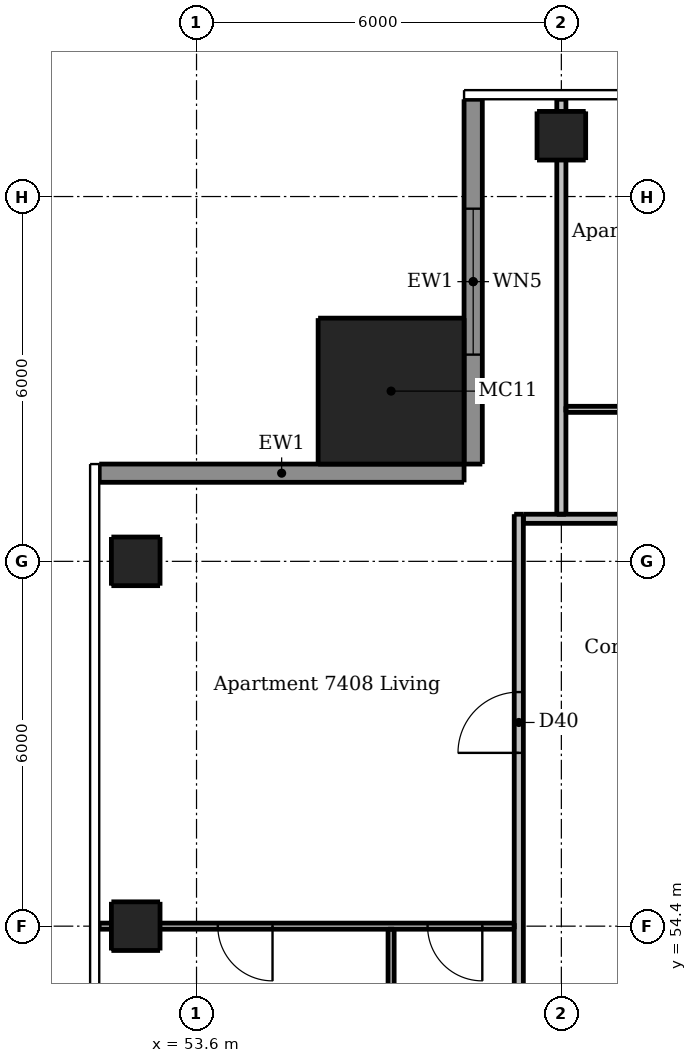
"""IFC4 building model, lengths in metres.
Left out: names, types, materials, properties, quantities, classifications, styles, units other than length and angle.
Written with IfcOpenShell. Run it as: python <this file> out.ifc"""

import sys

from ifc_helpers import new_model, si_unit, direction, frame, frame_2d, origin, origin_2d, place, context, subcontext, project, spatial, rectangle, extrude, element, fill, save


model = new_model("IFC4")
c1 = context("Model", 3, precision=1e-05, world=origin(), true_north=direction((0.0, 1.0)))
c2 = subcontext(c1, "Body", "Model", "MODEL_VIEW")
j1 = project(units=[si_unit("LENGTHUNIT", "METRE"), si_unit("PLANEANGLEUNIT", "RADIAN")], contexts=[c1])
p1 = place(None, origin())
s1 = spatial("IfcSite", under=j1, at=p1, CompositionType="ELEMENT")
p2 = place(p1, origin())
s2 = spatial("IfcBuilding", under=s1, at=p2, CompositionType="ELEMENT")
p3 = place(p2, frame((0.0, 0.0, 275.2)))
s3 = spatial("IfcBuildingStorey", under=s2, at=p3, CompositionType="ELEMENT", Elevation=275.2)
for number, where, z_axis, x_axis in (
    (1, (59.6, 67.4, 0.0), (0.0, 0.0, 1.0), (1.0, 0.0, 0.0)),
    (2, (52.6, 54.4, 0.0), (0.0, 0.0, 1.0), (1.0, 0.0, 0.0)),
    (3, (52.6, 60.4, 0.0), (0.0, 0.0, 1.0), (1.0, 0.0, 0.0)),
):
    element("IfcColumn", number, at=place(p3, frame(where, z_axis=z_axis, x_axis=x_axis)), inside=s3, PredefinedType="COLUMN", context=c2, shape_type="SweptSolid", body=[
        extrude(rectangle(XDim=0.8, YDim=0.8, at=origin_2d()), origin(), (0.0, 0.0, 1.0), 3.05),
    ])
p4 = place(p3, frame((56.8, 63.2, 0.0), z_axis=(0.0, 0.0, 1.0), x_axis=(1.0, 0.0, 0.0)))
e4 = element("IfcColumn", 4, at=p4, inside=s3, PredefinedType="COLUMN", context=c2, shape_type="SweptSolid", body=[
    extrude(rectangle(XDim=2.4, YDim=2.4, at=origin_2d()), origin(), (0.0, 0.0, 1.0), 3.3),
])
p5 = place(p3, frame((58.15, 68.0, 0.0), z_axis=(0.0, 0.0, 1.0), x_axis=(0.0, -1.0, 0.0)))
e5 = element("IfcWall", 5, at=p5, inside=s3, PredefinedType="SOLIDWALL", context=c2, shape_type="SweptSolid", body=[
    extrude(rectangle(XDim=6.0, YDim=0.3, at=frame_2d((3.0, 0.0))), origin(), (0.0, 0.0, 1.0), 3.05),
])
p6 = place(p5, frame((1.8, 0.0, 0.15)))
e6 = element("IfcOpeningElement", 6, at=p6, cuts=e5, PredefinedType="OPENING", context=c2, shape_type="SweptSolid", body=[
    extrude(rectangle(XDim=2.4, YDim=2.1, at=frame_2d((1.2, 1.05))), frame((0.0, 0.16, 0.0), z_axis=(0.0, -1.0, 0.0), x_axis=(1.0, 0.0, 0.0)), (0.0, 0.0, 1.0), 0.32),
])
p7 = place(p3, frame((58.0, 61.85, 0.0), z_axis=(0.0, 0.0, 1.0), x_axis=(-1.0, 0.0, 0.0)))
e7 = element("IfcWall", 7, at=p7, inside=s3, PredefinedType="SOLIDWALL", context=c2, shape_type="SweptSolid", body=[
    extrude(rectangle(XDim=6.0, YDim=0.3, at=frame_2d((3.0, 0.0))), origin(), (0.0, 0.0, 1.0), 3.05),
])
p8 = place(p3, frame((56.8, 54.35, 0.0), z_axis=(0.0, 0.0, 1.0), x_axis=(0.0, -1.0, 0.0)))
e8 = element("IfcWall", 8, at=p8, inside=s3, PredefinedType="PARTITIONING", context=c2, shape_type="SweptSolid", body=[
    extrude(rectangle(XDim=5.875, YDim=0.1, at=frame_2d((2.938, 0.0))), origin(), (0.0, 0.0, 1.0), 3.05),
])
p9 = place(p8, frame((3.75, 0.0, 0.0)))
e9 = element("IfcOpeningElement", 9, at=p9, cuts=e8, PredefinedType="OPENING", context=c2, shape_type="SweptSolid", body=[
    extrude(rectangle(XDim=0.8, YDim=2.1, at=frame_2d((0.4, 1.05))), frame((0.0, 0.06, 0.0), z_axis=(0.0, -1.0, 0.0), x_axis=(1.0, 0.0, 0.0)), (0.0, 0.0, 1.0), 0.12),
])
p10 = place(p3, frame((59.675, 62.9, 0.0), z_axis=(0.0, 0.0, 1.0), x_axis=(1.0, 0.0, 0.0)))
e10 = element("IfcWall", 10, at=p10, inside=s3, PredefinedType="PARTITIONING", context=c2, shape_type="SweptSolid", body=[
    extrude(rectangle(XDim=17.85, YDim=0.1, at=frame_2d((8.925, 0.0))), origin(), (0.0, 0.0, 1.0), 3.05),
])
p11 = place(p10, frame((12.375, 0.0, 0.0)))
e11 = element("IfcOpeningElement", 11, at=p11, cuts=e10, PredefinedType="OPENING", context=c2, shape_type="SweptSolid", body=[
    extrude(rectangle(XDim=0.9, YDim=2.1, at=frame_2d((0.45, 1.05))), frame((0.0, 0.06, 0.0), z_axis=(0.0, -1.0, 0.0), x_axis=(1.0, 0.0, 0.0)), (0.0, 0.0, 1.0), 0.12),
])
p12 = place(p10, frame((16.275, 0.0, 0.0)))
e12 = element("IfcOpeningElement", 12, at=p12, cuts=e10, PredefinedType="OPENING", context=c2, shape_type="SweptSolid", body=[
    extrude(rectangle(XDim=0.9, YDim=2.1, at=frame_2d((0.45, 1.05))), frame((0.0, 0.06, 0.0), z_axis=(0.0, -1.0, 0.0), x_axis=(1.0, 0.0, 0.0)), (0.0, 0.0, 1.0), 0.12),
])
p13 = place(p10, frame((14.175, 0.0, 0.0)))
e13 = element("IfcOpeningElement", 13, at=p13, cuts=e10, PredefinedType="OPENING", context=c2, shape_type="SweptSolid", body=[
    extrude(rectangle(XDim=0.9, YDim=2.1, at=frame_2d((0.45, 1.05))), frame((0.0, 0.06, 0.0), z_axis=(0.0, -1.0, 0.0), x_axis=(1.0, 0.0, 0.0)), (0.0, 0.0, 1.0), 0.12),
])
p14 = place(p10, frame((1.275, 0.0, 0.0)))
e14 = element("IfcOpeningElement", 14, at=p14, cuts=e10, PredefinedType="OPENING", context=c2, shape_type="SweptSolid", body=[
    extrude(rectangle(XDim=0.9, YDim=2.1, at=frame_2d((0.45, 1.05))), frame((0.0, 0.06, 0.0), z_axis=(0.0, -1.0, 0.0), x_axis=(1.0, 0.0, 0.0)), (0.0, 0.0, 1.0), 0.12),
])
p15 = place(p10, frame((7.275, 0.0, 0.0)))
e15 = element("IfcOpeningElement", 15, at=p15, cuts=e10, PredefinedType="OPENING", context=c2, shape_type="SweptSolid", body=[
    extrude(rectangle(XDim=0.9, YDim=2.1, at=frame_2d((0.45, 1.05))), frame((0.0, 0.06, 0.0), z_axis=(0.0, -1.0, 0.0), x_axis=(1.0, 0.0, 0.0)), (0.0, 0.0, 1.0), 0.12),
])
p16 = place(p10, frame((4.325, 0.0, 0.0)))
e16 = element("IfcOpeningElement", 16, at=p16, cuts=e10, PredefinedType="OPENING", context=c2, shape_type="SweptSolid", body=[
    extrude(rectangle(XDim=0.8, YDim=2.1, at=frame_2d((0.4, 1.05))), frame((0.0, 0.06, 0.0), z_axis=(0.0, -1.0, 0.0), x_axis=(1.0, 0.0, 0.0)), (0.0, 0.0, 1.0), 0.12),
])
p17 = place(p10, frame((10.325, 0.0, 0.0)))
e17 = element("IfcOpeningElement", 17, at=p17, cuts=e10, PredefinedType="OPENING", context=c2, shape_type="SweptSolid", body=[
    extrude(rectangle(XDim=0.8, YDim=2.1, at=frame_2d((0.4, 1.05))), frame((0.0, 0.06, 0.0), z_axis=(0.0, -1.0, 0.0), x_axis=(1.0, 0.0, 0.0)), (0.0, 0.0, 1.0), 0.12),
])
p18 = place(p3, frame((58.825, 54.4, 0.0), z_axis=(0.0, 0.0, 1.0), x_axis=(-1.0, 0.0, 0.0)))
e18 = element("IfcWall", 18, at=p18, inside=s3, PredefinedType="PARTITIONING", context=c2, shape_type="SweptSolid", body=[
    extrude(rectangle(XDim=6.825, YDim=0.1, at=frame_2d((3.413, 0.0))), origin(), (0.0, 0.0, 1.0), 2.516),
])
p19 = place(p18, frame((0.525, 0.0, 0.0)))
e19 = element("IfcOpeningElement", 19, at=p19, cuts=e18, PredefinedType="OPENING", context=c2, shape_type="SweptSolid", body=[
    extrude(rectangle(XDim=0.9, YDim=2.1, at=frame_2d((0.45, 1.05))), frame((0.0, 0.06, 0.0), z_axis=(0.0, -1.0, 0.0), x_axis=(1.0, 0.0, 0.0)), (0.0, 0.0, 1.0), 0.12),
])
p20 = place(p18, frame((3.975, 0.0, 0.0)))
e20 = element("IfcOpeningElement", 20, at=p20, cuts=e18, PredefinedType="OPENING", context=c2, shape_type="SweptSolid", body=[
    extrude(rectangle(XDim=0.9, YDim=2.1, at=frame_2d((0.45, 1.05))), frame((0.0, 0.06, 0.0), z_axis=(0.0, -1.0, 0.0), x_axis=(1.0, 0.0, 0.0)), (0.0, 0.0, 1.0), 0.12),
])
p21 = place(p3, frame((58.9, 30.325, 0.0), z_axis=(0.0, 0.0, 1.0), x_axis=(0.0, 1.0, 0.0)))
e21 = element("IfcWall", 21, at=p21, inside=s3, PredefinedType="PARTITIONING", context=c2, shape_type="SweptSolid", body=[
    extrude(rectangle(XDim=30.85, YDim=0.15, at=frame_2d((15.425, 0.0))), origin(), (0.0, 0.0, 1.0), 3.05),
])
p22 = place(p21, frame((9.225, 0.0, 0.0)))
e22 = element("IfcOpeningElement", 22, at=p22, cuts=e21, PredefinedType="OPENING", context=c2, shape_type="SweptSolid", body=[
    extrude(rectangle(XDim=1.0, YDim=2.1, at=frame_2d((0.5, 1.05))), frame((0.0, 0.085, 0.0), z_axis=(0.0, -1.0, 0.0), x_axis=(1.0, 0.0, 0.0)), (0.0, 0.0, 1.0), 0.17),
])
p23 = place(p21, frame((26.925, 0.0, 0.0)))
e23 = element("IfcOpeningElement", 23, at=p23, cuts=e21, PredefinedType="OPENING", context=c2, shape_type="SweptSolid", body=[
    extrude(rectangle(XDim=1.0, YDim=2.1, at=frame_2d((0.5, 1.05))), frame((0.0, 0.085, 0.0), z_axis=(0.0, -1.0, 0.0), x_axis=(1.0, 0.0, 0.0)), (0.0, 0.0, 1.0), 0.17),
])
p24 = place(p3, frame((59.6, 61.175, 0.0), z_axis=(0.0, 0.0, 1.0), x_axis=(0.0, 1.0, 0.0)))
e24 = element("IfcWall", 24, at=p24, inside=s3, PredefinedType="PARTITIONING", context=c2, shape_type="SweptSolid", body=[
    extrude(rectangle(XDim=6.825, YDim=0.15, at=frame_2d((3.413, 0.0))), origin(), (0.0, 0.0, 1.0), 2.51),
])
p25 = place(p3, frame((58.975, 61.1, 0.0), z_axis=(0.0, 0.0, 1.0), x_axis=(1.0, 0.0, 0.0)))
e25 = element("IfcWall", 25, at=p25, inside=s3, PredefinedType="PARTITIONING", context=c2, shape_type="SweptSolid", body=[
    extrude(rectangle(XDim=29.25, YDim=0.15, at=frame_2d((14.625, 0.0))), origin(), (0.0, 0.0, 1.0), 3.05),
])
p26 = place(p25, frame((9.125, 0.0, 0.0)))
e26 = element("IfcOpeningElement", 26, at=p26, cuts=e25, PredefinedType="OPENING", context=c2, shape_type="SweptSolid", body=[
    extrude(rectangle(XDim=1.0, YDim=2.1, at=frame_2d((0.5, 1.05))), frame((0.0, 0.085, 0.0), z_axis=(0.0, -1.0, 0.0), x_axis=(1.0, 0.0, 0.0)), (0.0, 0.0, 1.0), 0.17),
])
p27 = place(p25, frame((26.475, 0.0, 0.0)))
e27 = element("IfcOpeningElement", 27, at=p27, cuts=e25, PredefinedType="OPENING", context=c2, shape_type="SweptSolid", body=[
    extrude(rectangle(XDim=1.0, YDim=2.1, at=frame_2d((0.5, 1.05))), frame((0.0, 0.085, 0.0), z_axis=(0.0, -1.0, 0.0), x_axis=(1.0, 0.0, 0.0)), (0.0, 0.0, 1.0), 0.17),
])
p28 = place(p6, origin())
e28 = element("IfcWindow", 28, at=p28, inside=s3, PartitioningType="DOUBLE_PANEL_VERTICAL", PredefinedType="WINDOW", context=c2, shape_type="SweptSolid", body=[
    extrude(rectangle(XDim=2.4, YDim=2.1, at=frame_2d((1.2, 1.05))), frame((0.0, 0.03, 0.0), z_axis=(0.0, -1.0, 0.0), x_axis=(1.0, 0.0, 0.0)), (0.0, 0.0, 1.0), 0.06),
])
fill(e6, e28)
p29 = place(p23, origin())
e29 = element("IfcDoor", 29, at=p29, inside=s3, OperationType="SINGLE_SWING_LEFT", PredefinedType="DOOR", context=c2, shape_type="SweptSolid", body=[
    extrude(rectangle(XDim=1.0, YDim=2.1, at=frame_2d((0.5, 1.05))), frame((0.0, 0.025, 0.0), z_axis=(0.0, -1.0, 0.0), x_axis=(1.0, 0.0, 0.0)), (0.0, 0.0, 1.0), 0.05),
])
fill(e23, e29)
p30 = place(p19, origin())
e30 = element("IfcDoor", 30, at=p30, inside=s3, OperationType="SINGLE_SWING_LEFT", PredefinedType="DOOR", context=c2, shape_type="SweptSolid", body=[
    extrude(rectangle(XDim=0.9, YDim=2.1, at=frame_2d((0.45, 1.05))), frame((0.0, 0.025, 0.0), z_axis=(0.0, -1.0, 0.0), x_axis=(1.0, 0.0, 0.0)), (0.0, 0.0, 1.0), 0.05),
])
fill(e19, e30)
p31 = place(p20, origin())
e31 = element("IfcDoor", 31, at=p31, inside=s3, OperationType="SINGLE_SWING_LEFT", PredefinedType="DOOR", context=c2, shape_type="SweptSolid", body=[
    extrude(rectangle(XDim=0.9, YDim=2.1, at=frame_2d((0.45, 1.05))), frame((0.0, 0.025, 0.0), z_axis=(0.0, -1.0, 0.0), x_axis=(1.0, 0.0, 0.0)), (0.0, 0.0, 1.0), 0.05),
])
fill(e20, e31)
save(model, sys.argv[1])
